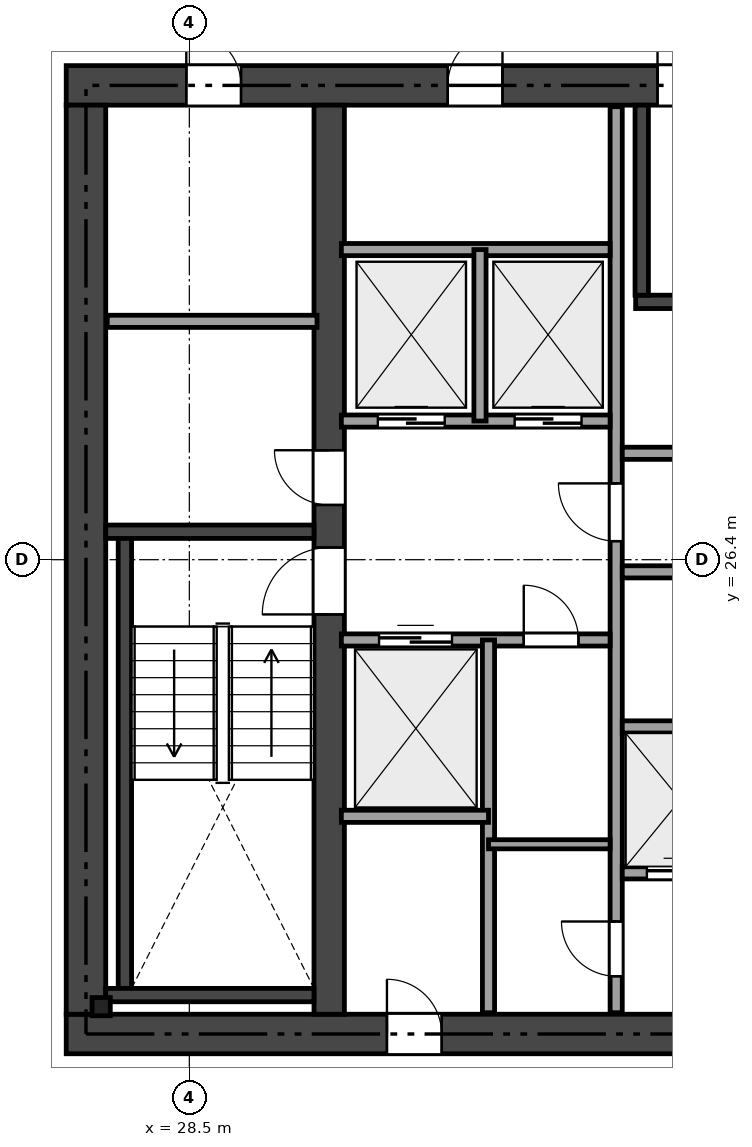
"""IFC4 building model, lengths in metres.
Left out: names, types, materials, properties, quantities, classifications, styles, units other than length and angle.
Written with IfcOpenShell. Run it as: python <this file> out.ifc"""

import sys

from ifc_helpers import new_model, si_unit, direction, frame, frame_2d, origin, origin_2d, place, context, subcontext, project, spatial, rectangle, i_section, extrude, element, fill, save


model = new_model("IFC4")
c1 = context("Model", 3, precision=1e-05, world=origin(), true_north=direction((0.0, 1.0)))
c2 = subcontext(c1, "Body", "Model", "MODEL_VIEW")
j1 = project(units=[si_unit("LENGTHUNIT", "METRE"), si_unit("PLANEANGLEUNIT", "RADIAN")], contexts=[c1])
p1 = place(None, origin())
s1 = spatial("IfcSite", under=j1, at=p1, CompositionType="ELEMENT")
p2 = place(p1, origin())
s2 = spatial("IfcBuilding", under=s1, at=p2, CompositionType="ELEMENT")
p3 = place(p2, frame((0.0, 0.0, 37.35)))
s3 = spatial("IfcBuildingStorey", under=s2, at=p3, CompositionType="ELEMENT", Elevation=37.35)
p4 = place(p3, frame((26.475, 18.6, 0.0), z_axis=(0.0, 0.0, 1.0), x_axis=(1.0, 0.0, 0.0)))
e1 = element("IfcWall", 1, at=p4, inside=s3, PredefinedType="SHEAR", context=c2, shape_type="SweptSolid", body=[
    extrude(rectangle(XDim=21.45, YDim=0.65, at=frame_2d((10.725, 0.0))), origin(), (0.0, 0.0, 1.0), 3.17),
])
p5 = place(p4, frame((12.45, 0.0, 0.0)))
e2 = element("IfcOpeningElement", 2, at=p5, cuts=e1, PredefinedType="OPENING", context=c2, shape_type="SweptSolid", body=[
    extrude(rectangle(XDim=1.15, YDim=2.15, at=frame_2d((0.575, 1.075))), frame((0.0, 0.335, 0.0), z_axis=(0.0, -1.0, 0.0), x_axis=(1.0, 0.0, 0.0)), (0.0, 0.0, 1.0), 0.67),
])
p6 = place(p4, frame((5.275, 0.0, 0.0)))
e3 = element("IfcOpeningElement", 3, at=p6, cuts=e1, PredefinedType="OPENING", context=c2, shape_type="SweptSolid", body=[
    extrude(rectangle(XDim=0.9, YDim=2.1, at=frame_2d((0.45, 1.05))), frame((0.0, 0.335, 0.0), z_axis=(0.0, -1.0, 0.0), x_axis=(1.0, 0.0, 0.0)), (0.0, 0.0, 1.0), 0.67),
])
p7 = place(p3, frame((26.475, 34.2, 0.0), z_axis=(0.0, 0.0, 1.0), x_axis=(1.0, 0.0, 0.0)))
e4 = element("IfcWall", 4, at=p7, inside=s3, PredefinedType="SHEAR", context=c2, shape_type="SweptSolid", body=[
    extrude(rectangle(XDim=21.45, YDim=0.65, at=frame_2d((10.725, 0.0))), origin(), (0.0, 0.0, 1.0), 3.17),
])
p8 = place(p7, frame((9.725, 0.0, 0.0)))
e5 = element("IfcOpeningElement", 5, at=p8, cuts=e4, PredefinedType="OPENING", context=c2, shape_type="SweptSolid", body=[
    extrude(rectangle(XDim=1.1, YDim=2.15, at=frame_2d((0.55, 1.075))), frame((0.0, 0.335, 0.0), z_axis=(0.0, -1.0, 0.0), x_axis=(1.0, 0.0, 0.0)), (0.0, 0.0, 1.0), 0.67),
])
p9 = place(p7, frame((1.975, 0.0, 0.0)))
e6 = element("IfcOpeningElement", 6, at=p9, cuts=e4, PredefinedType="OPENING", context=c2, shape_type="SweptSolid", body=[
    extrude(rectangle(XDim=0.9, YDim=2.1, at=frame_2d((0.45, 1.05))), frame((0.0, 0.335, 0.0), z_axis=(0.0, -1.0, 0.0), x_axis=(1.0, 0.0, 0.0)), (0.0, 0.0, 1.0), 0.67),
])
p10 = place(p7, frame((6.275, 0.0, 0.0)))
e7 = element("IfcOpeningElement", 7, at=p10, cuts=e4, PredefinedType="OPENING", context=c2, shape_type="SweptSolid", body=[
    extrude(rectangle(XDim=0.9, YDim=2.1, at=frame_2d((0.45, 1.05))), frame((0.0, 0.335, 0.0), z_axis=(0.0, -1.0, 0.0), x_axis=(1.0, 0.0, 0.0)), (0.0, 0.0, 1.0), 0.67),
])
p11 = place(p3, frame((26.8, 18.925, 0.0), z_axis=(0.0, 0.0, 1.0), x_axis=(0.0, 1.0, 0.0)))
e8 = element("IfcWall", 8, at=p11, inside=s3, PredefinedType="SHEAR", context=c2, shape_type="SweptSolid", body=[
    extrude(rectangle(XDim=14.95, YDim=0.65, at=frame_2d((7.475, 0.0))), origin(), (0.0, 0.0, 1.0), 3.17),
])
p12 = place(p3, frame((30.8, 18.925, 0.0), z_axis=(0.0, 0.0, 1.0), x_axis=(0.0, 1.0, 0.0)))
e9 = element("IfcWall", 9, at=p12, inside=s3, PredefinedType="SHEAR", context=c2, shape_type="SweptSolid", body=[
    extrude(rectangle(XDim=14.95, YDim=0.5, at=frame_2d((7.475, 0.0))), origin(), (0.0, 0.0, 1.0), 3.17),
])
p13 = place(p12, frame((6.575, 0.0, 0.0)))
e10 = element("IfcOpeningElement", 10, at=p13, cuts=e9, PredefinedType="OPENING", context=c2, shape_type="SweptSolid", body=[
    extrude(rectangle(XDim=1.1, YDim=2.15, at=frame_2d((0.55, 1.075))), frame((0.0, 0.26, 0.0), z_axis=(0.0, -1.0, 0.0), x_axis=(1.0, 0.0, 0.0)), (0.0, 0.0, 1.0), 0.52),
])
p14 = place(p12, frame((8.375, 0.0, 0.0)))
e11 = element("IfcOpeningElement", 11, at=p14, cuts=e9, PredefinedType="OPENING", context=c2, shape_type="SweptSolid", body=[
    extrude(rectangle(XDim=0.9, YDim=2.1, at=frame_2d((0.45, 1.05))), frame((0.0, 0.26, 0.0), z_axis=(0.0, -1.0, 0.0), x_axis=(1.0, 0.0, 0.0)), (0.0, 0.0, 1.0), 0.52),
])
p15 = place(p3, frame((27.125, 26.86, 0.0), z_axis=(0.0, 0.0, 1.0), x_axis=(1.0, 0.0, 0.0)))
e12 = element("IfcWall", 12, at=p15, inside=s3, PredefinedType="SHEAR", context=c2, shape_type="SweptSolid", body=[
    extrude(rectangle(XDim=3.425, YDim=0.22, at=frame_2d((1.712, 0.0))), origin(), (0.0, 0.0, 1.0), 3.17),
])
p16 = place(p3, frame((27.44, 19.35, 0.0), z_axis=(0.0, 0.0, 1.0), x_axis=(0.0, 1.0, 0.0)))
e13 = element("IfcWall", 13, at=p16, inside=s3, PredefinedType="SHEAR", context=c2, shape_type="SweptSolid", body=[
    extrude(rectangle(XDim=7.4, YDim=0.22, at=frame_2d((3.7, 0.0))), origin(), (0.0, 0.0, 1.0), 3.17),
])
p17 = place(p3, frame((27.125, 19.24, 0.0), z_axis=(0.0, 0.0, 1.0), x_axis=(1.0, 0.0, 0.0)))
e14 = element("IfcWall", 14, at=p17, inside=s3, PredefinedType="SHEAR", context=c2, shape_type="SweptSolid", body=[
    extrude(rectangle(XDim=3.425, YDim=0.22, at=frame_2d((1.712, 0.0))), origin(), (0.0, 0.0, 1.0), 3.17),
])
p18 = place(p3, frame((35.84, 30.64, 0.0), z_axis=(0.0, 0.0, 1.0), x_axis=(1.0, 0.0, 0.0)))
e15 = element("IfcWall", 15, at=p18, inside=s3, PredefinedType="SHEAR", context=c2, shape_type="SweptSolid", body=[
    extrude(rectangle(XDim=7.61, YDim=0.22, at=frame_2d((3.805, 0.0))), origin(), (0.0, 0.0, 1.0), 3.17),
])
p19 = place(p3, frame((35.94, 30.75, 0.0), z_axis=(0.0, 0.0, 1.0), x_axis=(0.0, 1.0, 0.0)))
e16 = element("IfcWall", 16, at=p19, inside=s3, PredefinedType="SHEAR", context=c2, shape_type="SweptSolid", body=[
    extrude(rectangle(XDim=3.125, YDim=0.22, at=frame_2d((1.562, 0.0))), origin(), (0.0, 0.0, 1.0), 3.17),
])
p20 = place(p3, frame((27.05, 19.05, 0.0), z_axis=(0.0, 0.0, 1.0), x_axis=(1.0, 0.0, 0.0)))
e17 = element("IfcColumn", 17, at=p20, inside=s3, PredefinedType="PILASTER", context=c2, shape_type="SweptSolid", body=[
    extrude(i_section(OverallWidth=0.3, OverallDepth=0.3, WebThickness=0.011, FlangeThickness=0.019, at=origin_2d()), origin(), (0.0, 0.0, 1.0), 3.17),
])
p21 = place(p3, frame((27.15, 30.32, 0.0), z_axis=(0.0, 0.0, 1.0), x_axis=(1.0, 0.0, 0.0)))
e18 = element("IfcWall", 18, at=p21, inside=s3, PredefinedType="SOLIDWALL", context=c2, shape_type="SweptSolid", body=[
    extrude(rectangle(XDim=3.45, YDim=0.2, at=frame_2d((1.725, 0.0))), origin(), (0.0, 0.0, 1.0), 3.17),
])
p22 = place(p3, frame((35.52, 18.95, 0.0), z_axis=(0.0, 0.0, 1.0), x_axis=(0.0, 1.0, 0.0)))
e19 = element("IfcWall", 19, at=p22, inside=s3, PredefinedType="SOLIDWALL", context=c2, shape_type="SweptSolid", body=[
    extrude(rectangle(XDim=14.9, YDim=0.2, at=frame_2d((7.45, 0.0))), origin(), (0.0, 0.0, 1.0), 2.691),
])
p23 = place(p22, frame((7.755, 0.0, 0.0)))
e20 = element("IfcOpeningElement", 20, at=p23, cuts=e19, PredefinedType="OPENING", context=c2, shape_type="SweptSolid", body=[
    extrude(rectangle(XDim=0.95, YDim=2.15, at=frame_2d((0.475, 1.075))), frame((0.0, 0.11, 0.0), z_axis=(0.0, -1.0, 0.0), x_axis=(1.0, 0.0, 0.0)), (0.0, 0.0, 1.0), 0.22),
])
p24 = place(p22, frame((0.6, 0.0, 0.0)))
e21 = element("IfcOpeningElement", 21, at=p24, cuts=e19, PredefinedType="OPENING", context=c2, shape_type="SweptSolid", body=[
    extrude(rectangle(XDim=0.9, YDim=2.1, at=frame_2d((0.45, 1.05))), frame((0.0, 0.11, 0.0), z_axis=(0.0, -1.0, 0.0), x_axis=(1.0, 0.0, 0.0)), (0.0, 0.0, 1.0), 0.22),
])
p25 = place(p3, frame((31.0, 28.68, 0.0), z_axis=(0.0, 0.0, 1.0), x_axis=(1.0, 0.0, 0.0)))
e22 = element("IfcWall", 22, at=p25, inside=s3, PredefinedType="SOLIDWALL", context=c2, shape_type="SweptSolid", body=[
    extrude(rectangle(XDim=4.42, YDim=0.2, at=frame_2d((2.21, 0.0))), origin(), (0.0, 0.0, 1.0), 3.17),
])
p26 = place(p25, frame((0.6, 0.0, 0.0)))
e23 = element("IfcOpeningElement", 23, at=p26, cuts=e22, PredefinedType="OPENING", context=c2, shape_type="SweptSolid", body=[
    extrude(rectangle(XDim=1.1, YDim=2.15, at=frame_2d((0.55, 1.075))), frame((0.0, 0.11, 0.0), z_axis=(0.0, -1.0, 0.0), x_axis=(1.0, 0.0, 0.0)), (0.0, 0.0, 1.0), 0.22),
])
p27 = place(p25, frame((2.85, 0.0, 0.0)))
e24 = element("IfcOpeningElement", 24, at=p27, cuts=e22, PredefinedType="OPENING", context=c2, shape_type="SweptSolid", body=[
    extrude(rectangle(XDim=1.1, YDim=2.15, at=frame_2d((0.55, 1.075))), frame((0.0, 0.11, 0.0), z_axis=(0.0, -1.0, 0.0), x_axis=(1.0, 0.0, 0.0)), (0.0, 0.0, 1.0), 0.22),
])
p28 = place(p3, frame((31.0, 31.5, 0.0), z_axis=(0.0, 0.0, 1.0), x_axis=(1.0, 0.0, 0.0)))
e25 = element("IfcWall", 25, at=p28, inside=s3, PredefinedType="SOLIDWALL", context=c2, shape_type="SweptSolid", body=[
    extrude(rectangle(XDim=4.42, YDim=0.2, at=frame_2d((2.21, 0.0))), origin(), (0.0, 0.0, 1.0), 3.17),
])
p29 = place(p3, frame((33.28, 28.68, 0.0), z_axis=(0.0, 0.0, 1.0), x_axis=(0.0, 1.0, 0.0)))
e26 = element("IfcWall", 26, at=p29, inside=s3, PredefinedType="SOLIDWALL", context=c2, shape_type="SweptSolid", body=[
    extrude(rectangle(XDim=2.82, YDim=0.2, at=frame_2d((1.41, 0.0))), origin(), (0.0, 0.0, 1.0), 3.17),
])
p30 = place(p3, frame((31.0, 25.08, 0.0), z_axis=(0.0, 0.0, 1.0), x_axis=(1.0, 0.0, 0.0)))
e27 = element("IfcWall", 27, at=p30, inside=s3, PredefinedType="SOLIDWALL", context=c2, shape_type="SweptSolid", body=[
    extrude(rectangle(XDim=4.42, YDim=0.2, at=frame_2d((2.21, 0.0))), origin(), (0.0, 0.0, 1.0), 3.17),
])
p31 = place(p30, frame((3.0, 0.0, 0.0)))
e28 = element("IfcOpeningElement", 28, at=p31, cuts=e27, PredefinedType="OPENING", context=c2, shape_type="SweptSolid", body=[
    extrude(rectangle(XDim=0.9, YDim=2.1, at=frame_2d((0.45, 1.05))), frame((0.0, 0.11, 0.0), z_axis=(0.0, -1.0, 0.0), x_axis=(1.0, 0.0, 0.0)), (0.0, 0.0, 1.0), 0.22),
])
p32 = place(p30, frame((0.62, 0.0, 0.0)))
e29 = element("IfcOpeningElement", 29, at=p32, cuts=e27, PredefinedType="OPENING", context=c2, shape_type="SweptSolid", body=[
    extrude(rectangle(XDim=1.2, YDim=2.15, at=frame_2d((0.6, 1.075))), frame((0.0, 0.11, 0.0), z_axis=(0.0, -1.0, 0.0), x_axis=(1.0, 0.0, 0.0)), (0.0, 0.0, 1.0), 0.22),
])
p33 = place(p3, frame((33.42, 18.95, 0.0), z_axis=(0.0, 0.0, 1.0), x_axis=(0.0, 1.0, 0.0)))
e30 = element("IfcWall", 30, at=p33, inside=s3, PredefinedType="SOLIDWALL", context=c2, shape_type="SweptSolid", body=[
    extrude(rectangle(XDim=6.13, YDim=0.2, at=frame_2d((3.065, 0.0))), origin(), (0.0, 0.0, 1.0), 2.691),
])
p34 = place(p3, frame((31.0, 22.18, 0.0), z_axis=(0.0, 0.0, 1.0), x_axis=(1.0, 0.0, 0.0)))
e31 = element("IfcWall", 31, at=p34, inside=s3, PredefinedType="SOLIDWALL", context=c2, shape_type="SweptSolid", body=[
    extrude(rectangle(XDim=2.42, YDim=0.2, at=frame_2d((1.21, 0.0))), origin(), (0.0, 0.0, 1.0), 3.17),
])
p35 = place(p3, frame((33.42, 21.72, 0.0), z_axis=(0.0, 0.0, 1.0), x_axis=(1.0, 0.0, 0.0)))
e32 = element("IfcWall", 32, at=p35, inside=s3, PredefinedType="PARTITIONING", context=c2, shape_type="SweptSolid", body=[
    extrude(rectangle(XDim=2.0, YDim=0.15, at=frame_2d((1.0, 0.0))), origin(), (0.0, 0.0, 1.0), 3.17),
])
for number, where, z_axis, x_axis in (
    (33, (35.62, 28.15, 0.0), (0.0, 0.0, 1.0), (1.0, 0.0, 0.0)),
    (34, (35.62, 26.2, 0.0), (0.0, 0.0, 1.0), (1.0, 0.0, 0.0)),
):
    element("IfcWall", number, at=place(p3, frame(where, z_axis=z_axis, x_axis=x_axis)), inside=s3, PredefinedType="SOLIDWALL", context=c2, shape_type="SweptSolid", body=[
        extrude(rectangle(XDim=7.88, YDim=0.2, at=frame_2d((3.94, 0.0))), origin(), (0.0, 0.0, 1.0), 3.17),
    ])
p36 = place(p3, frame((35.62, 23.65, 0.0), z_axis=(0.0, 0.0, 1.0), x_axis=(1.0, 0.0, 0.0)))
e35 = element("IfcWall", 35, at=p36, inside=s3, PredefinedType="SOLIDWALL", context=c2, shape_type="SweptSolid", body=[
    extrude(rectangle(XDim=7.88, YDim=0.2, at=frame_2d((3.94, 0.0))), origin(), (0.0, 0.0, 1.0), 2.691),
])
p37 = place(p3, frame((35.62, 21.25, 0.0), z_axis=(0.0, 0.0, 1.0), x_axis=(1.0, 0.0, 0.0)))
e36 = element("IfcWall", 36, at=p37, inside=s3, PredefinedType="SOLIDWALL", context=c2, shape_type="SweptSolid", body=[
    extrude(rectangle(XDim=7.88, YDim=0.2, at=frame_2d((3.94, 0.0))), origin(), (0.0, 0.0, 1.0), 3.17),
])
p38 = place(p37, frame((0.405, 0.0, 0.0)))
e37 = element("IfcOpeningElement", 37, at=p38, cuts=e36, PredefinedType="OPENING", context=c2, shape_type="SweptSolid", body=[
    extrude(rectangle(XDim=1.1, YDim=2.15, at=frame_2d((0.55, 1.075))), frame((0.0, 0.11, 0.0), z_axis=(0.0, -1.0, 0.0), x_axis=(1.0, 0.0, 0.0)), (0.0, 0.0, 1.0), 0.22),
])
p39 = place(p37, frame((2.355, 0.0, 0.0)))
e38 = element("IfcOpeningElement", 38, at=p39, cuts=e36, PredefinedType="OPENING", context=c2, shape_type="SweptSolid", body=[
    extrude(rectangle(XDim=1.1, YDim=2.15, at=frame_2d((0.55, 1.075))), frame((0.0, 0.11, 0.0), z_axis=(0.0, -1.0, 0.0), x_axis=(1.0, 0.0, 0.0)), (0.0, 0.0, 1.0), 0.22),
])
p40 = place(p37, frame((4.305, 0.0, 0.0)))
e39 = element("IfcOpeningElement", 39, at=p40, cuts=e36, PredefinedType="OPENING", context=c2, shape_type="SweptSolid", body=[
    extrude(rectangle(XDim=1.1, YDim=2.15, at=frame_2d((0.55, 1.075))), frame((0.0, 0.11, 0.0), z_axis=(0.0, -1.0, 0.0), x_axis=(1.0, 0.0, 0.0)), (0.0, 0.0, 1.0), 0.22),
])
p41 = place(p37, frame((6.255, 0.0, 0.0)))
e40 = element("IfcOpeningElement", 40, at=p41, cuts=e36, PredefinedType="OPENING", context=c2, shape_type="SweptSolid", body=[
    extrude(rectangle(XDim=1.1, YDim=2.15, at=frame_2d((0.55, 1.075))), frame((0.0, 0.11, 0.0), z_axis=(0.0, -1.0, 0.0), x_axis=(1.0, 0.0, 0.0)), (0.0, 0.0, 1.0), 0.22),
])
p42 = place(p13, origin())
e41 = element("IfcDoor", 41, at=p42, inside=s3, OperationType="SINGLE_SWING_LEFT", PredefinedType="DOOR", context=c2, shape_type="SweptSolid", body=[
    extrude(rectangle(XDim=1.1, YDim=2.15, at=frame_2d((0.55, 1.075))), frame((0.0, 0.025, 0.0), z_axis=(0.0, -1.0, 0.0), x_axis=(1.0, 0.0, 0.0)), (0.0, 0.0, 1.0), 0.05),
])
fill(e10, e41)
p43 = place(p8, origin())
e42 = element("IfcDoor", 42, at=p43, inside=s3, OperationType="SINGLE_SWING_LEFT", PredefinedType="DOOR", context=c2, shape_type="SweptSolid", body=[
    extrude(rectangle(XDim=1.1, YDim=2.15, at=frame_2d((0.55, 1.075))), frame((0.0, 0.025, 0.0), z_axis=(0.0, -1.0, 0.0), x_axis=(1.0, 0.0, 0.0)), (0.0, 0.0, 1.0), 0.05),
])
fill(e5, e42)
p44 = place(p23, origin())
e43 = element("IfcDoor", 43, at=p44, inside=s3, OperationType="SINGLE_SWING_RIGHT", PredefinedType="DOOR", context=c2, shape_type="SweptSolid", body=[
    extrude(rectangle(XDim=0.95, YDim=2.15, at=frame_2d((0.475, 1.075))), frame((0.0, 0.025, 0.0), z_axis=(0.0, -1.0, 0.0), x_axis=(1.0, 0.0, 0.0)), (0.0, 0.0, 1.0), 0.05),
])
fill(e20, e43)
p45 = place(p14, origin())
e44 = element("IfcDoor", 44, at=p45, inside=s3, OperationType="SINGLE_SWING_RIGHT", PredefinedType="DOOR", context=c2, shape_type="SweptSolid", body=[
    extrude(rectangle(XDim=0.9, YDim=2.1, at=frame_2d((0.45, 1.05))), frame((0.0, 0.025, 0.0), z_axis=(0.0, -1.0, 0.0), x_axis=(1.0, 0.0, 0.0)), (0.0, 0.0, 1.0), 0.05),
])
fill(e11, e44)
p46 = place(p9, origin())
e45 = element("IfcDoor", 45, at=p46, inside=s3, OperationType="SINGLE_SWING_LEFT", PredefinedType="DOOR", context=c2, shape_type="SweptSolid", body=[
    extrude(rectangle(XDim=0.9, YDim=2.1, at=frame_2d((0.45, 1.05))), frame((0.0, 0.025, 0.0), z_axis=(0.0, -1.0, 0.0), x_axis=(1.0, 0.0, 0.0)), (0.0, 0.0, 1.0), 0.05),
])
fill(e6, e45)
p47 = place(p10, origin())
e46 = element("IfcDoor", 46, at=p47, inside=s3, OperationType="SINGLE_SWING_RIGHT", PredefinedType="DOOR", context=c2, shape_type="SweptSolid", body=[
    extrude(rectangle(XDim=0.9, YDim=2.1, at=frame_2d((0.45, 1.05))), frame((0.0, 0.025, 0.0), z_axis=(0.0, -1.0, 0.0), x_axis=(1.0, 0.0, 0.0)), (0.0, 0.0, 1.0), 0.05),
])
fill(e7, e46)
p48 = place(p6, origin())
e47 = element("IfcDoor", 47, at=p48, inside=s3, OperationType="SINGLE_SWING_LEFT", PredefinedType="DOOR", context=c2, shape_type="SweptSolid", body=[
    extrude(rectangle(XDim=0.9, YDim=2.1, at=frame_2d((0.45, 1.05))), frame((0.0, 0.025, 0.0), z_axis=(0.0, -1.0, 0.0), x_axis=(1.0, 0.0, 0.0)), (0.0, 0.0, 1.0), 0.05),
])
fill(e3, e47)
p49 = place(p24, origin())
e48 = element("IfcDoor", 48, at=p49, inside=s3, OperationType="SINGLE_SWING_RIGHT", PredefinedType="DOOR", context=c2, shape_type="SweptSolid", body=[
    extrude(rectangle(XDim=0.9, YDim=2.1, at=frame_2d((0.45, 1.05))), frame((0.0, 0.025, 0.0), z_axis=(0.0, -1.0, 0.0), x_axis=(1.0, 0.0, 0.0)), (0.0, 0.0, 1.0), 0.05),
])
fill(e21, e48)
p50 = place(p31, origin())
e49 = element("IfcDoor", 49, at=p50, inside=s3, OperationType="SINGLE_SWING_LEFT", PredefinedType="DOOR", context=c2, shape_type="SweptSolid", body=[
    extrude(rectangle(XDim=0.9, YDim=2.1, at=frame_2d((0.45, 1.05))), frame((0.0, 0.025, 0.0), z_axis=(0.0, -1.0, 0.0), x_axis=(1.0, 0.0, 0.0)), (0.0, 0.0, 1.0), 0.05),
])
fill(e28, e49)
p51 = place(p26, origin())
e50 = element("IfcDoor", 50, at=p51, inside=s3, OperationType="SLIDING_TO_LEFT", PredefinedType="DOOR", context=c2, shape_type="SweptSolid", body=[
    extrude(rectangle(XDim=1.1, YDim=2.15, at=frame_2d((0.55, 1.075))), frame((0.0, 0.025, 0.0), z_axis=(0.0, -1.0, 0.0), x_axis=(1.0, 0.0, 0.0)), (0.0, 0.0, 1.0), 0.05),
])
fill(e23, e50)
p52 = place(p27, origin())
e51 = element("IfcDoor", 51, at=p52, inside=s3, OperationType="SLIDING_TO_LEFT", PredefinedType="DOOR", context=c2, shape_type="SweptSolid", body=[
    extrude(rectangle(XDim=1.1, YDim=2.15, at=frame_2d((0.55, 1.075))), frame((0.0, 0.025, 0.0), z_axis=(0.0, -1.0, 0.0), x_axis=(1.0, 0.0, 0.0)), (0.0, 0.0, 1.0), 0.05),
])
fill(e24, e51)
p53 = place(p32, origin())
e52 = element("IfcDoor", 52, at=p53, inside=s3, OperationType="SLIDING_TO_LEFT", PredefinedType="DOOR", context=c2, shape_type="SweptSolid", body=[
    extrude(rectangle(XDim=1.2, YDim=2.15, at=frame_2d((0.6, 1.075))), frame((0.0, 0.025, 0.0), z_axis=(0.0, -1.0, 0.0), x_axis=(1.0, 0.0, 0.0)), (0.0, 0.0, 1.0), 0.05),
])
fill(e29, e52)
p54 = place(p38, origin())
e53 = element("IfcDoor", 53, at=p54, inside=s3, OperationType="SLIDING_TO_LEFT", PredefinedType="DOOR", context=c2, shape_type="SweptSolid", body=[
    extrude(rectangle(XDim=1.1, YDim=2.15, at=frame_2d((0.55, 1.075))), frame((0.0, 0.025, 0.0), z_axis=(0.0, -1.0, 0.0), x_axis=(1.0, 0.0, 0.0)), (0.0, 0.0, 1.0), 0.05),
])
fill(e37, e53)
save(model, sys.argv[1])
